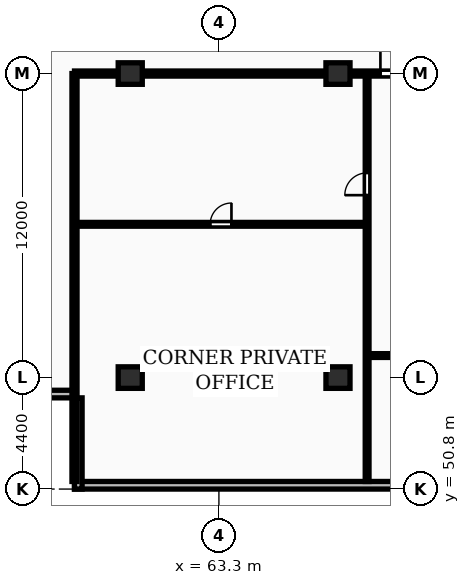
"""IFC4 building model, lengths in metres.
Left out: names, types, materials, properties, quantities, classifications, styles, units other than length and angle.
Written with IfcOpenShell. Run it as: python <this file> out.ifc"""

import sys

from ifc_helpers import new_model, si_unit, direction, frame, frame_2d, origin, origin_2d, place, context, subcontext, project, spatial, rectangle, extrude, element, fill, save


model = new_model("IFC4")
c1 = context("Model", 3, precision=1e-05, world=origin(), true_north=direction((0.0, 1.0)))
c2 = subcontext(c1, "Body", "Model", "MODEL_VIEW")
j1 = project(units=[si_unit("LENGTHUNIT", "METRE"), si_unit("PLANEANGLEUNIT", "RADIAN")], contexts=[c1])
p1 = place(None, origin())
s1 = spatial("IfcSite", under=j1, at=p1, CompositionType="ELEMENT")
p2 = place(p1, origin())
s2 = spatial("IfcBuilding", under=s1, at=p2, CompositionType="ELEMENT")
p3 = place(p2, frame((0.0, 0.0, 100.3)))
s3 = spatial("IfcBuildingStorey", under=s2, at=p3, CompositionType="ELEMENT", Elevation=100.3)
for number, where, z_axis, x_axis in (
    (1, (59.8, 55.2, 0.0), (0.0, 0.0, 1.0), (1.0, 0.0, 0.0)),
    (2, (59.8, 67.2, 0.0), (0.0, 0.0, 1.0), (1.0, 0.0, 0.0)),
    (3, (68.0, 55.2, 0.0), (0.0, 0.0, 1.0), (1.0, 0.0, 0.0)),
    (4, (68.0, 67.2, 0.0), (0.0, 0.0, 1.0), (1.0, 0.0, 0.0)),
):
    element("IfcColumn", number, at=place(p3, frame(where, z_axis=z_axis, x_axis=x_axis)), inside=s3, PredefinedType="COLUMN", context=c2, shape_type="SweptSolid", body=[
        extrude(rectangle(XDim=0.95, YDim=0.85, at=origin_2d()), origin(), (0.0, 0.0, 1.0), 3.25),
    ])
p4 = place(p3, frame((57.6, 50.95, 0.0), z_axis=(0.0, 0.0, 1.0), x_axis=(1.0, 0.0, 0.0)))
e5 = element("IfcWall", 5, at=p4, inside=s3, PredefinedType="STANDARD", context=c2, shape_type="SweptSolid", body=[
    extrude(rectangle(XDim=73.0, YDim=0.3, at=frame_2d((36.5, 0.0))), origin(), (0.0, 0.0, 1.0), 2.97),
])
p5 = place(p4, frame((15.225, 0.0, 0.85)))
e6 = element("IfcOpeningElement", 6, at=p5, cuts=e5, PredefinedType="OPENING", context=c2, shape_type="SweptSolid", body=[
    extrude(rectangle(XDim=1.8, YDim=1.8, at=frame_2d((0.9, 0.9))), frame((0.0, 0.16, 0.0), z_axis=(0.0, -1.0, 0.0), x_axis=(1.0, 0.0, 0.0)), (0.0, 0.0, 1.0), 0.32),
])
p6 = place(p4, frame((58.575, 0.0, 0.85)))
e7 = element("IfcOpeningElement", 7, at=p6, cuts=e5, PredefinedType="OPENING", context=c2, shape_type="SweptSolid", body=[
    extrude(rectangle(XDim=1.8, YDim=1.8, at=frame_2d((0.9, 0.9))), frame((0.0, 0.16, 0.0), z_axis=(0.0, -1.0, 0.0), x_axis=(1.0, 0.0, 0.0)), (0.0, 0.0, 1.0), 0.32),
])
p7 = place(p3, frame((54.0, 54.55, 0.0), z_axis=(0.0, 0.0, 1.0), x_axis=(1.0, 0.0, 0.0)))
e8 = element("IfcWall", 8, at=p7, inside=s3, PredefinedType="STANDARD", context=c2, shape_type="SweptSolid", body=[
    extrude(rectangle(XDim=3.6, YDim=0.3, at=frame_2d((1.8, 0.0))), origin(), (0.0, 0.0, 1.0), 2.97),
])
p8 = place(p3, frame((57.75, 54.4, 0.0), z_axis=(0.0, 0.0, 1.0), x_axis=(0.0, -1.0, 0.0)))
e9 = element("IfcWall", 9, at=p8, inside=s3, PredefinedType="STANDARD", context=c2, shape_type="SweptSolid", body=[
    extrude(rectangle(XDim=3.6, YDim=0.3, at=frame_2d((1.8, 0.0))), origin(), (0.0, 0.0, 1.0), 2.97),
])
p9 = place(p3, frame((57.6, 51.1, 0.0), z_axis=(0.0, 0.0, 1.0), x_axis=(0.0, 1.0, 0.0)))
e10 = element("IfcWall", 10, at=p9, inside=s3, PredefinedType="PARTITIONING", context=c2, shape_type="SweptSolid", body=[
    extrude(rectangle(XDim=16.1, YDim=0.2, at=frame_2d((8.05, 0.0))), origin(), (0.0, 0.0, 1.0), 2.97),
])
p10 = place(p3, frame((57.6, 61.25, 0.0), z_axis=(0.0, 0.0, 1.0), x_axis=(1.0, 0.0, 0.0)))
e11 = element("IfcWall", 11, at=p10, inside=s3, PredefinedType="PARTITIONING", context=c2, shape_type="SweptSolid", body=[
    extrude(rectangle(XDim=11.55, YDim=0.15, at=frame_2d((5.775, 0.0))), origin(), (0.0, 0.0, 1.0), 2.97),
])
p11 = place(p10, frame((5.355, 0.0, 0.0)))
e12 = element("IfcOpeningElement", 12, at=p11, cuts=e11, PredefinedType="OPENING", context=c2, shape_type="SweptSolid", body=[
    extrude(rectangle(XDim=0.84, YDim=2.04, at=frame_2d((0.42, 1.02))), frame((0.0, 0.085, 0.0), z_axis=(0.0, -1.0, 0.0), x_axis=(1.0, 0.0, 0.0)), (0.0, 0.0, 1.0), 0.17),
])
p12 = place(p3, frame((69.15, 51.1, 0.0), z_axis=(0.0, 0.0, 1.0), x_axis=(0.0, 1.0, 0.0)))
e13 = element("IfcWall", 13, at=p12, inside=s3, PredefinedType="PARTITIONING", context=c2, shape_type="SweptSolid", body=[
    extrude(rectangle(XDim=16.05, YDim=0.15, at=frame_2d((8.025, 0.0))), origin(), (0.0, 0.0, 1.0), 2.97),
])
p13 = place(p12, frame((11.3, 0.0, 0.0)))
e14 = element("IfcOpeningElement", 14, at=p13, cuts=e13, PredefinedType="OPENING", context=c2, shape_type="SweptSolid", body=[
    extrude(rectangle(XDim=0.88, YDim=2.06, at=frame_2d((0.44, 1.03))), frame((0.0, 0.085, 0.0), z_axis=(0.0, -1.0, 0.0), x_axis=(1.0, 0.0, 0.0)), (0.0, 0.0, 1.0), 0.17),
])
p14 = place(p3, frame((69.17, 56.07, 0.0), z_axis=(0.0, 0.0, 1.0), x_axis=(1.0, 0.0, 0.0)))
e15 = element("IfcWall", 15, at=p14, inside=s3, PredefinedType="PARTITIONING", context=c2, shape_type="SweptSolid", body=[
    extrude(rectangle(XDim=6.76, YDim=0.15, at=frame_2d((3.38, 0.0))), origin(), (0.0, 0.0, 1.0), 2.97),
])
p15 = place(p14, frame((1.362, 0.0, 0.0)))
e16 = element("IfcOpeningElement", 16, at=p15, cuts=e15, PredefinedType="OPENING", context=c2, shape_type="SweptSolid", body=[
    extrude(rectangle(XDim=0.84, YDim=2.04, at=frame_2d((0.42, 1.02))), frame((0.0, 0.085, 0.0), z_axis=(0.0, -1.0, 0.0), x_axis=(1.0, 0.0, 0.0)), (0.0, 0.0, 1.0), 0.17),
])
p16 = place(p14, frame((4.277, 0.0, 0.0)))
e17 = element("IfcOpeningElement", 17, at=p16, cuts=e15, PredefinedType="OPENING", context=c2, shape_type="SweptSolid", body=[
    extrude(rectangle(XDim=0.88, YDim=2.06, at=frame_2d((0.44, 1.03))), frame((0.0, 0.085, 0.0), z_axis=(0.0, -1.0, 0.0), x_axis=(1.0, 0.0, 0.0)), (0.0, 0.0, 1.0), 0.17),
])
p17 = place(p3, frame((57.6, 67.2, 0.0), z_axis=(0.0, 0.0, 1.0), x_axis=(1.0, 0.0, 0.0)))
e18 = element("IfcWall", 18, at=p17, inside=s3, PredefinedType="PARTITIONING", context=c2, shape_type="SweptSolid", body=[
    extrude(rectangle(XDim=18.35, YDim=0.2, at=frame_2d((9.175, 0.0))), origin(), (0.0, 0.0, 1.0), 2.433),
])
p18 = place(p17, frame((12.075, 0.0, 0.0)))
e19 = element("IfcOpeningElement", 19, at=p18, cuts=e18, PredefinedType="OPENING", context=c2, shape_type="SweptSolid", body=[
    extrude(rectangle(XDim=0.95, YDim=2.15, at=frame_2d((0.475, 1.075))), frame((0.0, 0.11, 0.0), z_axis=(0.0, -1.0, 0.0), x_axis=(1.0, 0.0, 0.0)), (0.0, 0.0, 1.0), 0.22),
])
p19 = place(p11, origin())
e20 = element("IfcDoor", 20, at=p19, inside=s3, OperationType="SINGLE_SWING_RIGHT", PredefinedType="DOOR", context=c2, shape_type="SweptSolid", body=[
    extrude(rectangle(XDim=0.84, YDim=2.04, at=frame_2d((0.42, 1.02))), frame((0.0, 0.025, 0.0), z_axis=(0.0, -1.0, 0.0), x_axis=(1.0, 0.0, 0.0)), (0.0, 0.0, 1.0), 0.05),
])
fill(e12, e20)
p20 = place(p13, origin())
e21 = element("IfcDoor", 21, at=p20, inside=s3, OperationType="SINGLE_SWING_LEFT", PredefinedType="DOOR", context=c2, shape_type="SweptSolid", body=[
    extrude(rectangle(XDim=0.88, YDim=2.06, at=frame_2d((0.44, 1.03))), frame((0.0, 0.025, 0.0), z_axis=(0.0, -1.0, 0.0), x_axis=(1.0, 0.0, 0.0)), (0.0, 0.0, 1.0), 0.05),
])
fill(e14, e21)
p21 = place(p18, origin())
e22 = element("IfcDoor", 22, at=p21, inside=s3, OperationType="SINGLE_SWING_LEFT", PredefinedType="DOOR", context=c2, shape_type="SweptSolid", body=[
    extrude(rectangle(XDim=0.95, YDim=2.15, at=frame_2d((0.475, 1.075))), frame((0.0, 0.025, 0.0), z_axis=(0.0, -1.0, 0.0), x_axis=(1.0, 0.0, 0.0)), (0.0, 0.0, 1.0), 0.05),
])
fill(e19, e22)
save(model, sys.argv[1])
